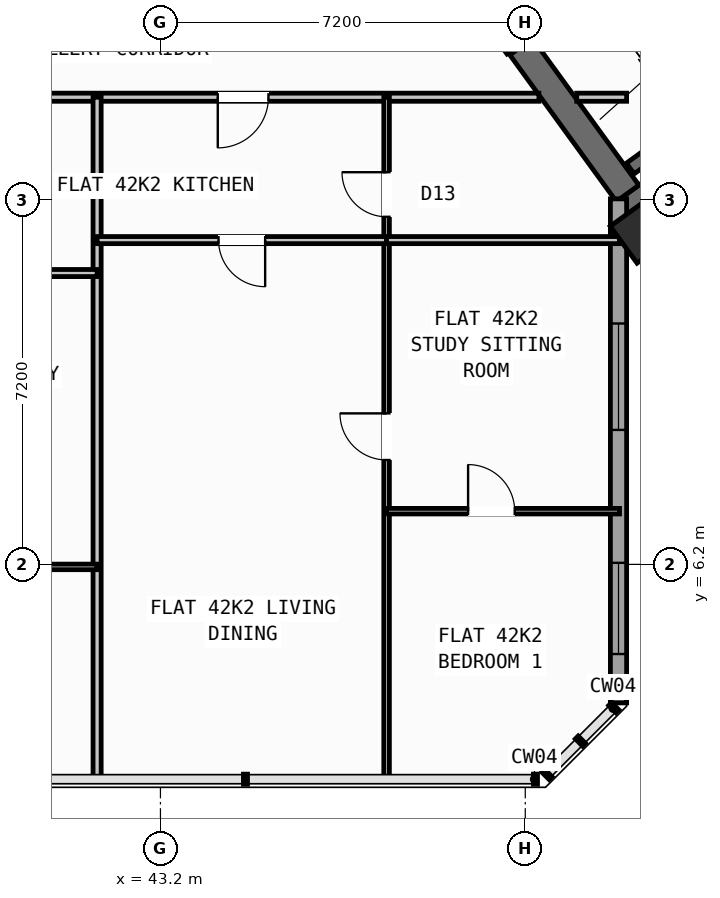
"""IFC4 building model, lengths in metres.
Left out: names, types, materials, properties, quantities, classifications, styles, units other than length and angle.
Written with IfcOpenShell. Run it as: python <this file> out.ifc"""

import sys

from ifc_helpers import new_model, si_unit, direction, frame, frame_2d, origin, origin_2d, place, context, subcontext, project, spatial, rectangle, hollow_rectangle, extrude, source, transform, mapped, element, fill, save


model = new_model("IFC4")
c1 = context("Model", 3, precision=1e-05, world=origin(), true_north=direction((0.0, 1.0)))
c2 = subcontext(c1, "Body", "Model", "MODEL_VIEW")
j1 = project(units=[si_unit("LENGTHUNIT", "METRE"), si_unit("PLANEANGLEUNIT", "RADIAN")], contexts=[c1])
p1 = place(None, origin())
s1 = spatial("IfcSite", under=j1, at=p1, CompositionType="ELEMENT")
p2 = place(p1, origin())
s2 = spatial("IfcBuilding", under=s1, at=p2, CompositionType="ELEMENT")
p3 = place(p2, frame((0.0, 0.0, 165.9)))
s3 = spatial("IfcBuildingStorey", under=s2, at=p3, CompositionType="ELEMENT", Elevation=165.9)
p4 = place(p3, frame((52.359, 13.14, 0.0), z_axis=(0.0, 0.0, 1.0), x_axis=(0.809014896919, 0.587788139183, 0.0)))
e1 = element("IfcWall", 1, at=p4, inside=s3, PredefinedType="SHEAR", context=c2, shape_type="SweptSolid", body=[
    extrude(rectangle(XDim=12.34, YDim=0.55, at=frame_2d((6.17, 0.0))), origin(), (0.0, 0.0, 1.0), 3.32),
])
p5 = place(p3, frame((52.42, 13.524, 0.0), z_axis=(0.0, 0.0, 1.0), x_axis=(-0.587802113096, 0.809004744015, 0.0)))
e2 = element("IfcWall", 2, at=p5, inside=s3, PredefinedType="SHEAR", context=c2, shape_type="SweptSolid", body=[
    extrude(rectangle(XDim=3.575, YDim=0.55, at=frame_2d((1.788, 0.0))), origin(), (0.0, 0.0, 1.0), 3.32),
])
m1 = source(origin(), c2, "Body", "SweptSolid", [
    extrude(hollow_rectangle(XDim=0.9, YDim=0.9, WallThickness=0.036, at=origin_2d()), origin(), (0.0, 0.0, 1.0), 3.6),
])
p6 = place(p3, frame((52.705, 12.773, 0.0), z_axis=(0.0, 0.0, 1.0), x_axis=(0.809016994375, 0.587785252292, 0.0)))
e3 = element("IfcColumn", 3, at=p6, inside=s3, PredefinedType="COLUMN", context=c2, shape_type="MappedRepresentation", body=[
    mapped(m1, transform((0.0, 0.0, 0.0), scale=1.0)),
])
p7 = place(p3, frame((56.581, 7.439, 0.0), z_axis=(0.0, 0.0, 1.0), x_axis=(-0.587771678454, 0.809026856172, 0.0)))
e4 = element("IfcWall", 4, at=p7, inside=s3, PredefinedType="STANDARD", context=c2, shape_type="SweptSolid", body=[
    extrude(rectangle(XDim=6.824, YDim=0.32, at=frame_2d((3.412, 0.0))), origin(), (0.0, 0.0, 1.0), 2.795),
])
p8 = place(p7, frame((1.531, 0.0, 0.8)))
e5 = element("IfcOpeningElement", 5, at=p8, cuts=e4, PredefinedType="OPENING", context=c2, shape_type="SweptSolid", body=[
    extrude(rectangle(XDim=2.1, YDim=1.55, at=frame_2d((1.05, 0.775))), frame((0.0, 0.17, 0.0), z_axis=(0.0, -1.0, 0.0), x_axis=(1.0, 0.0, 0.0)), (0.0, 0.0, 1.0), 0.34),
])
p9 = place(p3, frame((52.24, 13.414, 0.0), z_axis=(0.0, 0.0, 1.0), x_axis=(0.0, -1.0, 0.0)))
e6 = element("IfcWall", 6, at=p9, inside=s3, PredefinedType="STANDARD", context=c2, shape_type="SweptSolid", body=[
    extrude(rectangle(XDim=9.948, YDim=0.32, at=frame_2d((4.974, 0.0))), origin(), (0.0, 0.0, 1.0), 3.32),
])
p10 = place(p9, frame((2.46, 0.0, 0.8)))
e7 = element("IfcOpeningElement", 7, at=p10, cuts=e6, PredefinedType="OPENING", context=c2, shape_type="SweptSolid", body=[
    extrude(rectangle(XDim=2.1, YDim=1.55, at=frame_2d((1.05, 0.775))), frame((0.0, 0.17, 0.0), z_axis=(0.0, -1.0, 0.0), x_axis=(1.0, 0.0, 0.0)), (0.0, 0.0, 1.0), 0.34),
])
p11 = place(p9, frame((7.183, 0.0, 0.85)))
e8 = element("IfcOpeningElement", 8, at=p11, cuts=e6, PredefinedType="OPENING", context=c2, shape_type="SweptSolid", body=[
    extrude(rectangle(XDim=1.8, YDim=1.5, at=frame_2d((0.9, 0.75))), frame((0.0, 0.17, 0.0), z_axis=(0.0, -1.0, 0.0), x_axis=(1.0, 0.0, 0.0)), (0.0, 0.0, 1.0), 0.34),
])
p12 = place(p3, frame((52.472, 14.013, 0.0), z_axis=(0.0, 0.0, 1.0), x_axis=(0.809028366311, 0.587769599847, 0.0)))
e9 = element("IfcWall", 9, at=p12, inside=s3, PredefinedType="SHEAR", context=c2, shape_type="SweptSolid", body=[
    extrude(rectangle(XDim=7.33, YDim=0.26, at=frame_2d((3.665, 0.0))), origin(), (0.0, 0.0, 1.0), 3.32),
])
p13 = place(p3, frame((35.237, 15.42, 0.0), z_axis=(0.0, 0.0, 1.0), x_axis=(1.0, 0.0, 0.0)))
e10 = element("IfcWall", 10, at=p13, inside=s3, PredefinedType="PARTITIONING", context=c2, shape_type="SweptSolid", body=[
    extrude(rectangle(XDim=15.432, YDim=0.16, at=frame_2d((7.716, 0.0))), origin(), (0.0, 0.0, 1.0), 3.31),
])
p14 = place(p13, frame((0.674, 0.0, 0.0)))
e11 = element("IfcOpeningElement", 11, at=p14, cuts=e10, PredefinedType="OPENING", context=c2, shape_type="SweptSolid", body=[
    extrude(rectangle(XDim=1.0, YDim=2.1, at=frame_2d((0.5, 1.05))), frame((0.0, 0.09, 0.0), z_axis=(0.0, -1.0, 0.0), x_axis=(1.0, 0.0, 0.0)), (0.0, 0.0, 1.0), 0.18),
])
p15 = place(p13, frame((9.094, 0.0, 0.0)))
e12 = element("IfcOpeningElement", 12, at=p15, cuts=e10, PredefinedType="OPENING", context=c2, shape_type="SweptSolid", body=[
    extrude(rectangle(XDim=1.0, YDim=2.1, at=frame_2d((0.5, 1.05))), frame((0.0, 0.09, 0.0), z_axis=(0.0, -1.0, 0.0), x_axis=(1.0, 0.0, 0.0)), (0.0, 0.0, 1.0), 0.18),
])
p16 = place(p3, frame((51.416, 15.42, 0.0), z_axis=(0.0, 0.0, 1.0), x_axis=(1.0, 0.0, 0.0)))
e13 = element("IfcWall", 13, at=p16, inside=s3, PredefinedType="PARTITIONING", context=c2, shape_type="SweptSolid", body=[
    extrude(rectangle(XDim=0.984, YDim=0.16, at=frame_2d((0.492, 0.0))), origin(), (0.0, 0.0, 1.0), 3.31),
])
p17 = place(p3, frame((50.119, 16.333, 0.0), z_axis=(0.0, 0.0, 1.0), x_axis=(-0.587749856981, 0.809042709391, 0.0)))
e14 = element("IfcWall", 14, at=p17, inside=s3, PredefinedType="STANDARD", context=c2, shape_type="SweptSolid", body=[
    extrude(rectangle(XDim=2.96, YDim=0.2, at=frame_2d((1.48, 0.0))), origin(), (0.0, 0.0, 1.0), 3.31),
])
p18 = place(p17, frame((0.53, 0.0, 0.0)))
e15 = element("IfcOpeningElement", 15, at=p18, cuts=e14, PredefinedType="OPENING", context=c2, shape_type="SweptSolid", body=[
    extrude(rectangle(XDim=1.5, YDim=2.15, at=frame_2d((0.75, 1.075))), frame((0.0, 0.11, 0.0), z_axis=(0.0, -1.0, 0.0), x_axis=(1.0, 0.0, 0.0)), (0.0, 0.0, 1.0), 0.22),
])
p19 = place(p3, frame((41.95, 1.96, 0.0), z_axis=(0.0, 0.0, 1.0), x_axis=(0.0, 1.0, 0.0)))
e16 = element("IfcWall", 16, at=p19, inside=s3, PredefinedType="PARTITIONING", context=c2, shape_type="SweptSolid", body=[
    extrude(rectangle(XDim=13.46, YDim=0.16, at=frame_2d((6.73, 0.0))), origin(), (0.0, 0.0, 1.0), 3.31),
])
p20 = place(p3, frame((37.222, 11.95, 0.0), z_axis=(0.0, 0.0, 1.0), x_axis=(1.0, 0.0, 0.0)))
e17 = element("IfcWall", 17, at=p20, inside=s3, PredefinedType="PLUMBINGWALL", context=c2, shape_type="SweptSolid", body=[
    extrude(rectangle(XDim=4.728, YDim=0.14, at=frame_2d((2.364, 0.0))), origin(), (0.0, 0.0, 1.0), 2.495),
])
p21 = place(p3, frame((37.222, 6.15, 0.0), z_axis=(0.0, 0.0, 1.0), x_axis=(1.0, 0.0, 0.0)))
e18 = element("IfcWall", 18, at=p21, inside=s3, PredefinedType="PARTITIONING", context=c2, shape_type="SweptSolid", body=[
    extrude(rectangle(XDim=4.728, YDim=0.11, at=frame_2d((2.364, 0.0))), origin(), (0.0, 0.0, 1.0), 3.31),
])
p22 = place(p21, frame((1.904, 0.0, 0.0)))
e19 = element("IfcOpeningElement", 19, at=p22, cuts=e18, PredefinedType="OPENING", context=c2, shape_type="SweptSolid", body=[
    extrude(rectangle(XDim=0.92, YDim=2.08, at=frame_2d((0.46, 1.04))), frame((0.0, 0.065, 0.0), z_axis=(0.0, -1.0, 0.0), x_axis=(1.0, 0.0, 0.0)), (0.0, 0.0, 1.0), 0.13),
])
p23 = place(p3, frame((47.663, 1.96, 0.0), z_axis=(0.0, 0.0, 1.0), x_axis=(0.0, 1.0, 0.0)))
e20 = element("IfcWall", 20, at=p23, inside=s3, PredefinedType="PARTITIONING", context=c2, shape_type="SweptSolid", body=[
    extrude(rectangle(XDim=13.46, YDim=0.11, at=frame_2d((6.73, 0.0))), origin(), (0.0, 0.0, 1.0), 3.31),
])
p24 = place(p23, frame((6.3, 0.0, 0.0)))
e21 = element("IfcOpeningElement", 21, at=p24, cuts=e20, PredefinedType="OPENING", context=c2, shape_type="SweptSolid", body=[
    extrude(rectangle(XDim=0.92, YDim=2.08, at=frame_2d((0.46, 1.04))), frame((0.0, 0.065, 0.0), z_axis=(0.0, -1.0, 0.0), x_axis=(1.0, 0.0, 0.0)), (0.0, 0.0, 1.0), 0.13),
])
p25 = place(p23, frame((11.1, 0.0, 0.0)))
e22 = element("IfcOpeningElement", 22, at=p25, cuts=e20, PredefinedType="OPENING", context=c2, shape_type="SweptSolid", body=[
    extrude(rectangle(XDim=0.88, YDim=2.08, at=frame_2d((0.44, 1.04))), frame((0.0, 0.065, 0.0), z_axis=(0.0, -1.0, 0.0), x_axis=(1.0, 0.0, 0.0)), (0.0, 0.0, 1.0), 0.13),
])
p26 = place(p3, frame((41.95, 12.6, 0.0), z_axis=(0.0, 0.0, 1.0), x_axis=(1.0, 0.0, 0.0)))
e23 = element("IfcWall", 23, at=p26, inside=s3, PredefinedType="PLUMBINGWALL", context=c2, shape_type="SweptSolid", body=[
    extrude(rectangle(XDim=5.713, YDim=0.14, at=frame_2d((2.856, 0.0))), origin(), (0.0, 0.0, 1.0), 2.495),
])
p27 = place(p26, frame((2.396, 0.0, 0.0)))
e24 = element("IfcOpeningElement", 24, at=p27, cuts=e23, PredefinedType="OPENING", context=c2, shape_type="SweptSolid", body=[
    extrude(rectangle(XDim=0.92, YDim=2.08, at=frame_2d((0.46, 1.04))), frame((0.0, 0.08, 0.0), z_axis=(0.0, -1.0, 0.0), x_axis=(1.0, 0.0, 0.0)), (0.0, 0.0, 1.0), 0.16),
])
p28 = place(p3, frame((47.663, 12.6, 0.0), z_axis=(0.0, 0.0, 1.0), x_axis=(1.0, 0.0, 0.0)))
e25 = element("IfcWall", 25, at=p28, inside=s3, PredefinedType="PLUMBINGWALL", context=c2, shape_type="SweptSolid", body=[
    extrude(rectangle(XDim=4.597, YDim=0.14, at=frame_2d((2.298, 0.0))), origin(), (0.0, 0.0, 1.0), 2.495),
])
p29 = place(p3, frame((47.663, 7.25, 0.0), z_axis=(0.0, 0.0, 1.0), x_axis=(1.0, 0.0, 0.0)))
e26 = element("IfcWall", 26, at=p29, inside=s3, PredefinedType="PARTITIONING", context=c2, shape_type="SweptSolid", body=[
    extrude(rectangle(XDim=4.597, YDim=0.11, at=frame_2d((2.298, 0.0))), origin(), (0.0, 0.0, 1.0), 3.31),
])
p30 = place(p29, frame((1.608, 0.0, 0.0)))
e27 = element("IfcOpeningElement", 27, at=p30, cuts=e26, PredefinedType="OPENING", context=c2, shape_type="SweptSolid", body=[
    extrude(rectangle(XDim=0.92, YDim=2.08, at=frame_2d((0.46, 1.04))), frame((0.0, 0.065, 0.0), z_axis=(0.0, -1.0, 0.0), x_axis=(1.0, 0.0, 0.0)), (0.0, 0.0, 1.0), 0.13),
])
m2 = source(origin(), c2, "Body", "SweptSolid", [
    extrude(rectangle(XDim=2.1, YDim=1.55, at=frame_2d((1.05, 0.775))), frame((0.0, 0.03, 0.0), z_axis=(0.0, -1.0, 0.0), x_axis=(1.0, 0.0, 0.0)), (0.0, 0.0, 1.0), 0.06),
])
p31 = place(p10, origin())
e28 = element("IfcWindow", 28, at=p31, inside=s3, PartitioningType="SINGLE_PANEL", PredefinedType="WINDOW", context=c2, shape_type="MappedRepresentation", body=[
    mapped(m2, transform((0.0, 0.0, 0.0), scale=1.0)),
])
fill(e7, e28)
m3 = source(origin(), c2, "Body", "SweptSolid", [
    extrude(rectangle(XDim=1.8, YDim=1.5, at=frame_2d((0.9, 0.75))), frame((0.0, 0.03, 0.0), z_axis=(0.0, -1.0, 0.0), x_axis=(1.0, 0.0, 0.0)), (0.0, 0.0, 1.0), 0.06),
])
p32 = place(p11, origin())
e29 = element("IfcWindow", 29, at=p32, inside=s3, PartitioningType="SINGLE_PANEL", PredefinedType="WINDOW", context=c2, shape_type="MappedRepresentation", body=[
    mapped(m3, transform((0.0, 0.0, 0.0), scale=1.0)),
])
fill(e8, e29)
m4 = source(origin(), c2, "Body", "SweptSolid", [
    extrude(rectangle(XDim=0.92, YDim=2.08, at=frame_2d((0.46, 1.04))), frame((0.0, 0.025, 0.0), z_axis=(0.0, -1.0, 0.0), x_axis=(1.0, 0.0, 0.0)), (0.0, 0.0, 1.0), 0.05),
])
p33 = place(p24, origin())
e30 = element("IfcDoor", 30, at=p33, inside=s3, OperationType="SINGLE_SWING_RIGHT", PredefinedType="DOOR", context=c2, shape_type="MappedRepresentation", body=[
    mapped(m4, transform((0.0, 0.0, 0.0), scale=1.0)),
])
fill(e21, e30)
p34 = place(p30, origin())
e31 = element("IfcDoor", 31, at=p34, inside=s3, OperationType="SINGLE_SWING_LEFT", PredefinedType="DOOR", context=c2, shape_type="MappedRepresentation", body=[
    mapped(m4, transform((0.0, 0.0, 0.0), scale=1.0)),
])
fill(e27, e31)
m5 = source(origin(), c2, "Body", "SweptSolid", [
    extrude(rectangle(XDim=1.0, YDim=2.1, at=frame_2d((0.5, 1.05))), frame((0.0, 0.025, 0.0), z_axis=(0.0, -1.0, 0.0), x_axis=(1.0, 0.0, 0.0)), (0.0, 0.0, 1.0), 0.05),
])
p35 = place(p15, frame((1.0, 0.0, 0.0), z_axis=(0.0, 0.0, 1.0), x_axis=(-1.0, 0.0, 0.0)))
e32 = element("IfcDoor", 32, at=p35, inside=s3, OperationType="SINGLE_SWING_RIGHT", PredefinedType="DOOR", context=c2, shape_type="MappedRepresentation", body=[
    mapped(m5, transform((0.0, 0.0, 0.0), scale=1.0)),
])
fill(e12, e32)
p36 = place(p27, frame((0.92, 0.0, 0.0), z_axis=(0.0, 0.0, 1.0), x_axis=(-1.0, 0.0, 0.0)))
e33 = element("IfcDoor", 33, at=p36, inside=s3, OperationType="SINGLE_SWING_LEFT", PredefinedType="DOOR", context=c2, shape_type="MappedRepresentation", body=[
    mapped(m4, transform((0.0, 0.0, 0.0), scale=1.0)),
])
fill(e24, e33)
m6 = source(origin(), c2, "Body", "SweptSolid", [
    extrude(rectangle(XDim=0.88, YDim=2.08, at=frame_2d((0.44, 1.04))), frame((0.0, 0.025, 0.0), z_axis=(0.0, -1.0, 0.0), x_axis=(1.0, 0.0, 0.0)), (0.0, 0.0, 1.0), 0.05),
])
p37 = place(p25, origin())
e34 = element("IfcDoor", 34, at=p37, inside=s3, OperationType="SINGLE_SWING_RIGHT", PredefinedType="DOOR", context=c2, shape_type="MappedRepresentation", body=[
    mapped(m6, transform((0.0, 0.0, 0.0), scale=1.0)),
])
fill(e22, e34)
save(model, sys.argv[1])
